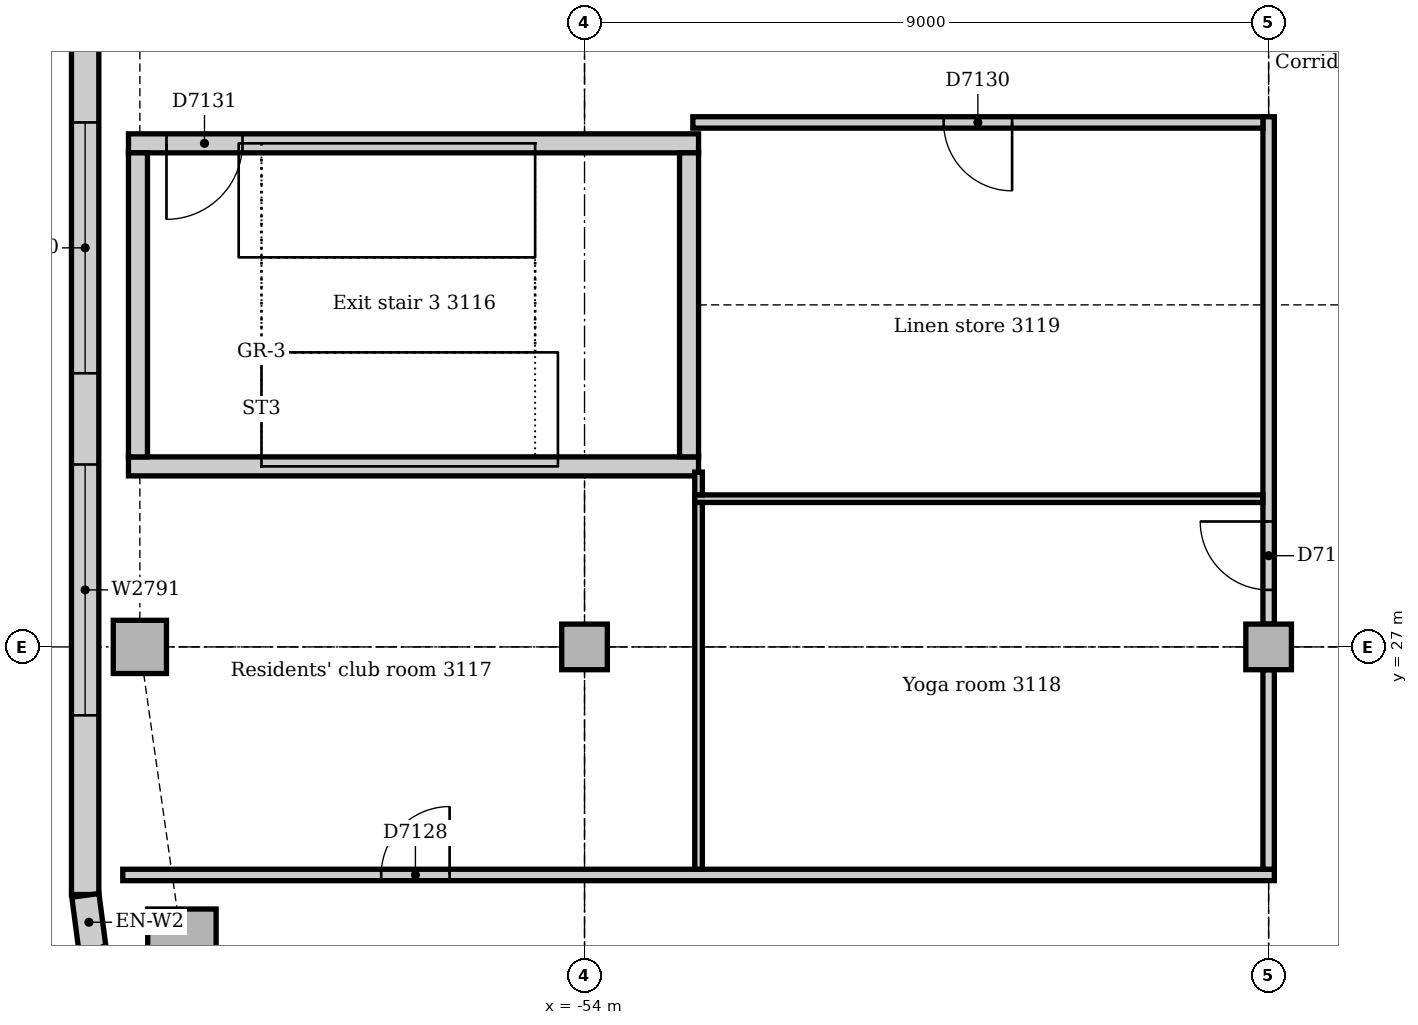
"""IFC4 building model, lengths in metres.
Left out: names, types, materials, properties, quantities, classifications, styles, units other than length and angle.
Written with IfcOpenShell. Run it as: python <this file> out.ifc"""

import sys

from ifc_helpers import new_model, si_unit, direction, frame, frame_2d, origin, origin_2d, place, context, subcontext, project, spatial, rectangle, extrude, element, fill, save


model = new_model("IFC4")
c1 = context("Model", 3, precision=1e-05, world=origin(), true_north=direction((0.0, 1.0)))
c2 = subcontext(c1, "Body", "Model", "MODEL_VIEW")
j1 = project(units=[si_unit("LENGTHUNIT", "METRE"), si_unit("PLANEANGLEUNIT", "RADIAN")], contexts=[c1])
p1 = place(None, origin())
s1 = spatial("IfcSite", under=j1, at=p1, CompositionType="ELEMENT")
p2 = place(p1, origin())
s2 = spatial("IfcBuilding", under=s1, at=p2, CompositionType="ELEMENT")
p3 = place(p2, frame((0.0, 0.0, 132.0)))
s3 = spatial("IfcBuildingStorey", under=s2, at=p3, CompositionType="ELEMENT", Elevation=132.0)
p4 = place(p3, frame((-60.0, 29.375, 0.0), z_axis=(0.0, 0.0, 1.0), x_axis=(1.0, 0.0, 0.0)))
e1 = element("IfcWall", 1, at=p4, inside=s3, PredefinedType="SOLIDWALL", context=c2, shape_type="SweptSolid", body=[
    extrude(rectangle(XDim=7.5, YDim=0.25, at=frame_2d((3.75, 0.0))), origin(), (0.0, 0.0, 1.0), 4.0),
])
p5 = place(p3, frame((-52.5, 33.625, 0.0), z_axis=(0.0, 0.0, 1.0), x_axis=(-1.0, 0.0, 0.0)))
e2 = element("IfcWall", 2, at=p5, inside=s3, PredefinedType="SOLIDWALL", context=c2, shape_type="SweptSolid", body=[
    extrude(rectangle(XDim=7.5, YDim=0.25, at=frame_2d((3.75, 0.0))), origin(), (0.0, 0.0, 1.0), 4.0),
])
p6 = place(p5, frame((6.0, 0.0, 0.0)))
e3 = element("IfcOpeningElement", 3, at=p6, cuts=e2, PredefinedType="OPENING", context=c2, shape_type="SweptSolid", body=[
    extrude(rectangle(XDim=1.0, YDim=2.1, at=frame_2d((0.5, 1.05))), frame((0.0, 0.135, 0.0), z_axis=(0.0, -1.0, 0.0), x_axis=(1.0, 0.0, 0.0)), (0.0, 0.0, 1.0), 0.27),
])
for number, where, z_axis, x_axis in (
    (4, (-52.625, 29.5, 0.0), (0.0, 0.0, 1.0), (0.0, 1.0, 0.0)),
    (5, (-59.875, 33.5, 0.0), (0.0, 0.0, 1.0), (0.0, -1.0, 0.0)),
):
    element("IfcWall", number, at=place(p3, frame(where, z_axis=z_axis, x_axis=x_axis)), inside=s3, PredefinedType="SOLIDWALL", context=c2, shape_type="SweptSolid", body=[
        extrude(rectangle(XDim=4.0, YDim=0.25, at=frame_2d((2.0, 0.0))), origin(), (0.0, 0.0, 1.0), 4.0),
    ])
p7 = place(p3, frame((-59.297, 23.102, 0.0), z_axis=(0.0, 0.0, 1.0), x_axis=(1.0, 0.0, 0.0)))
e6 = element("IfcColumn", 6, at=p7, inside=s3, PredefinedType="COLUMN", context=c2, shape_type="SweptSolid", body=[
    extrude(rectangle(XDim=0.9, YDim=0.9, at=origin_2d()), origin(), (0.0, 0.0, 1.0), 3.85),
])
p8 = place(p3, frame((-59.85, 27.0, 0.0), z_axis=(0.0, 0.0, 1.0), x_axis=(1.0, 0.0, 0.0)))
e7 = element("IfcColumn", 7, at=p8, inside=s3, PredefinedType="COLUMN", context=c2, shape_type="SweptSolid", body=[
    extrude(rectangle(XDim=0.7, YDim=0.7, at=origin_2d()), origin(), (0.0, 0.0, 1.0), 3.85),
])
for number, where, z_axis, x_axis in (
    (8, (-54.0, 27.0, 0.0), (0.0, 0.0, 1.0), (1.0, 0.0, 0.0)),
    (9, (-45.0, 27.0, 0.0), (0.0, 0.0, 1.0), (1.0, 0.0, 0.0)),
):
    element("IfcColumn", number, at=place(p3, frame(where, z_axis=z_axis, x_axis=x_axis)), inside=s3, PredefinedType="COLUMN", context=c2, shape_type="SweptSolid", body=[
        extrude(rectangle(XDim=0.6, YDim=0.6, at=origin_2d()), origin(), (0.0, 0.0, 1.0), 3.85),
    ])
p9 = place(p3, frame((-60.57, 45.257, 0.0), z_axis=(0.0, 0.0, 1.0), x_axis=(0.0, -1.0, 0.0)))
e10 = element("IfcWall", 10, at=p9, inside=s3, PredefinedType="STANDARD", context=c2, shape_type="SweptSolid", body=[
    extrude(rectangle(XDim=21.515, YDim=0.36, at=frame_2d((10.757, 0.0))), origin(), (0.0, 0.0, 1.0), 3.85),
])
p10 = place(p9, frame((2.457, 0.0, 0.9)))
e11 = element("IfcOpeningElement", 11, at=p10, cuts=e10, PredefinedType="OPENING", context=c2, shape_type="SweptSolid", body=[
    extrude(rectangle(XDim=3.3, YDim=1.6, at=frame_2d((1.65, 0.8))), frame((0.0, 0.19, 0.0), z_axis=(0.0, -1.0, 0.0), x_axis=(1.0, 0.0, 0.0)), (0.0, 0.0, 1.0), 0.38),
])
p11 = place(p9, frame((6.857, 0.0, 0.9)))
e12 = element("IfcOpeningElement", 12, at=p11, cuts=e10, PredefinedType="OPENING", context=c2, shape_type="SweptSolid", body=[
    extrude(rectangle(XDim=3.3, YDim=1.6, at=frame_2d((1.65, 0.8))), frame((0.0, 0.19, 0.0), z_axis=(0.0, -1.0, 0.0), x_axis=(1.0, 0.0, 0.0)), (0.0, 0.0, 1.0), 0.38),
])
p12 = place(p9, frame((11.357, 0.0, 0.9)))
e13 = element("IfcOpeningElement", 13, at=p12, cuts=e10, PredefinedType="OPENING", context=c2, shape_type="SweptSolid", body=[
    extrude(rectangle(XDim=3.3, YDim=1.6, at=frame_2d((1.65, 0.8))), frame((0.0, 0.19, 0.0), z_axis=(0.0, -1.0, 0.0), x_axis=(1.0, 0.0, 0.0)), (0.0, 0.0, 1.0), 0.38),
])
p13 = place(p9, frame((15.857, 0.0, 0.9)))
e14 = element("IfcOpeningElement", 14, at=p13, cuts=e10, PredefinedType="OPENING", context=c2, shape_type="SweptSolid", body=[
    extrude(rectangle(XDim=3.3, YDim=1.6, at=frame_2d((1.65, 0.8))), frame((0.0, 0.19, 0.0), z_axis=(0.0, -1.0, 0.0), x_axis=(1.0, 0.0, 0.0)), (0.0, 0.0, 1.0), 0.38),
])
p14 = place(p3, frame((-60.567, 23.731, 0.0), z_axis=(0.0, 0.0, 1.0), x_axis=(0.13055608231, -0.99144092581, 0.0)))
e15 = element("IfcWall", 15, at=p14, inside=s3, PredefinedType="STANDARD", context=c2, shape_type="SweptSolid", body=[
    extrude(rectangle(XDim=0.713, YDim=0.36, at=frame_2d((0.356, 0.0))), origin(), (0.0, 0.0, 1.0), 3.85),
])
p15 = place(p3, frame((-60.075, 24.0, 0.0), z_axis=(0.0, 0.0, 1.0), x_axis=(1.0, 0.0, 0.0)))
e16 = element("IfcWall", 16, at=p15, inside=s3, PredefinedType="PARTITIONING", context=c2, shape_type="SweptSolid", body=[
    extrude(rectangle(XDim=15.15, YDim=0.15, at=frame_2d((7.575, 0.0))), origin(), (0.0, 0.0, 1.0), 3.85),
])
p16 = place(p15, frame((3.4, 0.0, 0.0)))
e17 = element("IfcOpeningElement", 17, at=p16, cuts=e16, PredefinedType="OPENING", context=c2, shape_type="SweptSolid", body=[
    extrude(rectangle(XDim=0.9, YDim=2.1, at=frame_2d((0.45, 1.05))), frame((0.0, 0.085, 0.0), z_axis=(0.0, -1.0, 0.0), x_axis=(1.0, 0.0, 0.0)), (0.0, 0.0, 1.0), 0.17),
])
p17 = place(p3, frame((-45.0, 24.075, 0.0), z_axis=(0.0, 0.0, 1.0), x_axis=(0.0, 1.0, 0.0)))
e18 = element("IfcWall", 18, at=p17, inside=s3, PredefinedType="PARTITIONING", context=c2, shape_type="SweptSolid", body=[
    extrude(rectangle(XDim=2.625, YDim=0.15, at=frame_2d((1.312, 0.0))), origin(), (0.0, 0.0, 1.0), 3.362),
])
p18 = place(p3, frame((-45.0, 27.3, 0.0), z_axis=(0.0, 0.0, 1.0), x_axis=(0.0, 1.0, 0.0)))
e19 = element("IfcWall", 19, at=p18, inside=s3, PredefinedType="PARTITIONING", context=c2, shape_type="SweptSolid", body=[
    extrude(rectangle(XDim=6.675, YDim=0.15, at=frame_2d((3.337, 0.0))), origin(), (0.0, 0.0, 1.0), 3.362),
])
p19 = place(p18, frame((0.45, 0.0, 0.0)))
e20 = element("IfcOpeningElement", 20, at=p19, cuts=e19, PredefinedType="OPENING", context=c2, shape_type="SweptSolid", body=[
    extrude(rectangle(XDim=0.9, YDim=2.1, at=frame_2d((0.45, 1.05))), frame((0.0, 0.085, 0.0), z_axis=(0.0, -1.0, 0.0), x_axis=(1.0, 0.0, 0.0)), (0.0, 0.0, 1.0), 0.17),
])
p20 = place(p3, frame((-52.575, 33.9, 0.0), z_axis=(0.0, 0.0, 1.0), x_axis=(1.0, 0.0, 0.0)))
e21 = element("IfcWall", 21, at=p20, inside=s3, PredefinedType="PARTITIONING", context=c2, shape_type="SweptSolid", body=[
    extrude(rectangle(XDim=7.5, YDim=0.15, at=frame_2d((3.75, 0.0))), origin(), (0.0, 0.0, 1.0), 3.85),
])
p21 = place(p20, frame((3.3, 0.0, 0.0)))
e22 = element("IfcOpeningElement", 22, at=p21, cuts=e21, PredefinedType="OPENING", context=c2, shape_type="SweptSolid", body=[
    extrude(rectangle(XDim=0.9, YDim=2.1, at=frame_2d((0.45, 1.05))), frame((0.0, 0.085, 0.0), z_axis=(0.0, -1.0, 0.0), x_axis=(1.0, 0.0, 0.0)), (0.0, 0.0, 1.0), 0.17),
])
p22 = place(p3, frame((-52.55, 28.95, 0.0), z_axis=(0.0, 0.0, 1.0), x_axis=(1.0, 0.0, 0.0)))
e23 = element("IfcWall", 23, at=p22, inside=s3, PredefinedType="PARTITIONING", context=c2, shape_type="SweptSolid", body=[
    extrude(rectangle(XDim=7.475, YDim=0.1, at=frame_2d((3.737, 0.0))), origin(), (0.0, 0.0, 1.0), 3.85),
])
p23 = place(p3, frame((-52.5, 29.0, 0.0), z_axis=(0.0, 0.0, 1.0), x_axis=(0.0, 1.0, 0.0)))
e24 = element("IfcWall", 24, at=p23, inside=s3, PredefinedType="PARTITIONING", context=c2, shape_type="SweptSolid", body=[
    extrude(rectangle(XDim=0.3, YDim=0.1, at=frame_2d((0.15, 0.0))), origin(), (0.0, 0.0, 1.0), 3.85),
])
p24 = place(p3, frame((-52.5, 24.075, 0.0), z_axis=(0.0, 0.0, 1.0), x_axis=(0.0, 1.0, 0.0)))
e25 = element("IfcWall", 25, at=p24, inside=s3, PredefinedType="PARTITIONING", context=c2, shape_type="SweptSolid", body=[
    extrude(rectangle(XDim=4.825, YDim=0.1, at=frame_2d((2.413, 0.0))), origin(), (0.0, 0.0, 1.0), 3.85),
])
p25 = place(p12, origin())
e26 = element("IfcWindow", 26, at=p25, inside=s3, PartitioningType="SINGLE_PANEL", PredefinedType="WINDOW", context=c2, shape_type="SweptSolid", body=[
    extrude(rectangle(XDim=3.3, YDim=1.6, at=frame_2d((1.65, 0.8))), frame((0.0, 0.13, 0.0), z_axis=(0.0, -1.0, 0.0), x_axis=(1.0, 0.0, 0.0)), (0.0, 0.0, 1.0), 0.06),
])
fill(e13, e26)
p26 = place(p13, origin())
e27 = element("IfcWindow", 27, at=p26, inside=s3, PartitioningType="SINGLE_PANEL", PredefinedType="WINDOW", context=c2, shape_type="SweptSolid", body=[
    extrude(rectangle(XDim=3.3, YDim=1.6, at=frame_2d((1.65, 0.8))), frame((0.0, 0.13, 0.0), z_axis=(0.0, -1.0, 0.0), x_axis=(1.0, 0.0, 0.0)), (0.0, 0.0, 1.0), 0.06),
])
fill(e14, e27)
p27 = place(p16, origin())
e28 = element("IfcDoor", 28, at=p27, inside=s3, OperationType="SINGLE_SWING_RIGHT", PredefinedType="DOOR", context=c2, shape_type="SweptSolid", body=[
    extrude(rectangle(XDim=0.9, YDim=2.1, at=frame_2d((0.45, 1.05))), frame((0.0, 0.025, 0.0), z_axis=(0.0, -1.0, 0.0), x_axis=(1.0, 0.0, 0.0)), (0.0, 0.0, 1.0), 0.05),
])
fill(e17, e28)
p28 = place(p19, origin())
e29 = element("IfcDoor", 29, at=p28, inside=s3, OperationType="SINGLE_SWING_RIGHT", PredefinedType="DOOR", context=c2, shape_type="SweptSolid", body=[
    extrude(rectangle(XDim=0.9, YDim=2.1, at=frame_2d((0.45, 1.05))), frame((0.0, 0.025, 0.0), z_axis=(0.0, -1.0, 0.0), x_axis=(1.0, 0.0, 0.0)), (0.0, 0.0, 1.0), 0.05),
])
fill(e20, e29)
p29 = place(p21, frame((0.9, 0.0, 0.0), z_axis=(0.0, 0.0, 1.0), x_axis=(-1.0, 0.0, 0.0)))
e30 = element("IfcDoor", 30, at=p29, inside=s3, OperationType="SINGLE_SWING_LEFT", PredefinedType="DOOR", context=c2, shape_type="SweptSolid", body=[
    extrude(rectangle(XDim=0.9, YDim=2.1, at=frame_2d((0.45, 1.05))), frame((0.0, 0.025, 0.0), z_axis=(0.0, -1.0, 0.0), x_axis=(1.0, 0.0, 0.0)), (0.0, 0.0, 1.0), 0.05),
])
fill(e22, e30)
p30 = place(p6, origin())
e31 = element("IfcDoor", 31, at=p30, inside=s3, OperationType="SINGLE_SWING_RIGHT", PredefinedType="DOOR", context=c2, shape_type="SweptSolid", body=[
    extrude(rectangle(XDim=1.0, YDim=2.1, at=frame_2d((0.5, 1.05))), frame((0.0, 0.025, 0.0), z_axis=(0.0, -1.0, 0.0), x_axis=(1.0, 0.0, 0.0)), (0.0, 0.0, 1.0), 0.05),
])
fill(e3, e31)
save(model, sys.argv[1])
